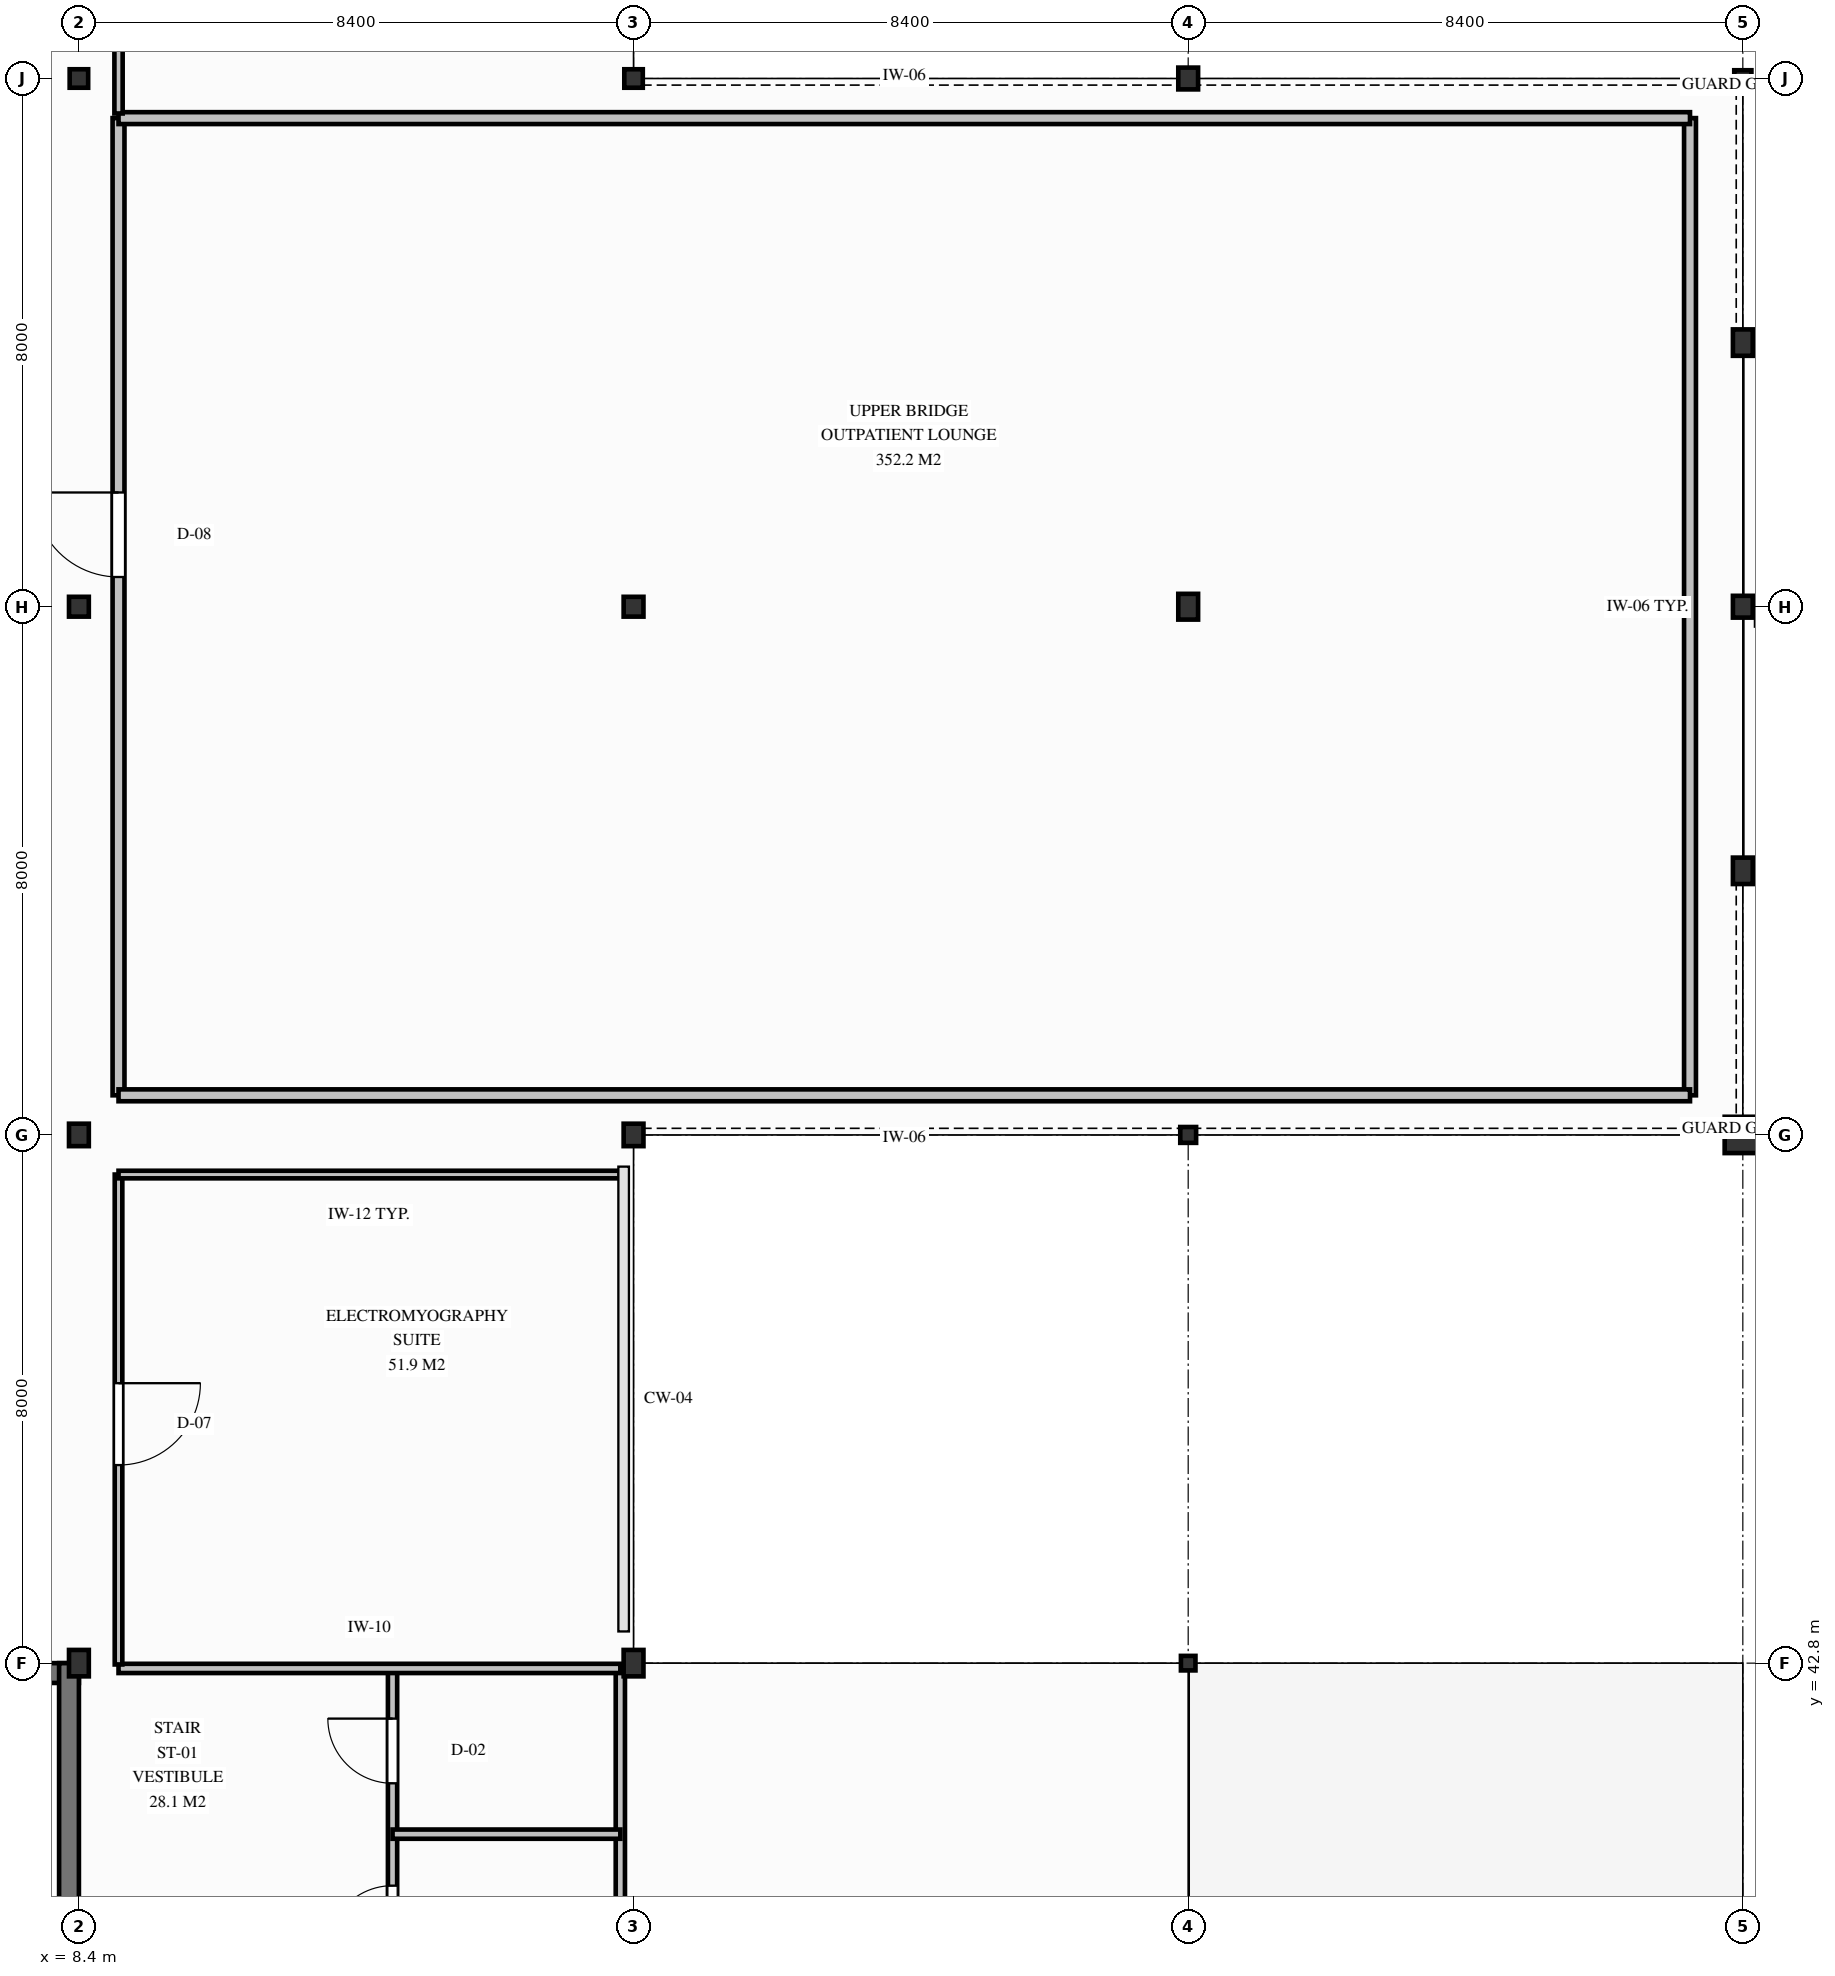
"""IFC4 building model, lengths in metres.
Left out: names, types, materials, properties, quantities, classifications, styles, units other than length and angle.
Written with IfcOpenShell. Run it as: python <this file> out.ifc"""

import sys

from ifc_helpers import new_model, si_unit, direction, frame, frame_2d, origin, origin_2d, place, context, subcontext, project, spatial, rectangle, hollow_rectangle, i_section, extrude, element, fill, save


model = new_model("IFC4")
c1 = context("Model", 3, precision=1e-05, world=origin(), true_north=direction((0.0, 1.0)))
c2 = subcontext(c1, "Body", "Model", "MODEL_VIEW")
j1 = project(units=[si_unit("LENGTHUNIT", "METRE"), si_unit("PLANEANGLEUNIT", "RADIAN")], contexts=[c1])
p1 = place(None, origin())
s1 = spatial("IfcSite", under=j1, at=p1, CompositionType="ELEMENT")
p2 = place(p1, origin())
s2 = spatial("IfcBuilding", under=s1, at=p2, CompositionType="ELEMENT")
p3 = place(p2, frame((0.0, 0.0, 9.0)))
s3 = spatial("IfcBuildingStorey", under=s2, at=p3, CompositionType="ELEMENT", Elevation=9.0)
p4 = place(p3, frame((0.0, 42.65, 0.0), z_axis=(0.0, 0.0, 1.0), x_axis=(1.0, 0.0, 0.0)))
e1 = element("IfcWall", 1, at=p4, inside=s3, PredefinedType="SHEAR", context=c2, shape_type="SweptSolid", body=[
    extrude(rectangle(XDim=8.4, YDim=0.3, at=frame_2d((4.2, 0.0))), origin(), (0.0, 0.0, 1.0), 4.2),
])
p5 = place(p3, frame((8.25, 34.8, 0.0), z_axis=(0.0, 0.0, 1.0), x_axis=(0.0, 1.0, 0.0)))
e2 = element("IfcWall", 2, at=p5, inside=s3, PredefinedType="SHEAR", context=c2, shape_type="SweptSolid", body=[
    extrude(rectangle(XDim=8.0, YDim=0.3, at=frame_2d((4.0, 0.0))), origin(), (0.0, 0.0, 1.0), 4.2),
])
p6 = place(p5, frame((2.95, 0.0, 0.0)))
e3 = element("IfcOpeningElement", 3, at=p6, cuts=e2, PredefinedType="OPENING", context=c2, shape_type="SweptSolid", body=[
    extrude(rectangle(XDim=1.1, YDim=2.15, at=frame_2d((0.55, 1.075))), frame((0.0, 0.16, 0.0), z_axis=(0.0, -1.0, 0.0), x_axis=(1.0, 0.0, 0.0)), (0.0, 0.0, 1.0), 0.32),
])
p7 = place(p5, frame((1.0, 0.0, 0.0)))
e4 = element("IfcOpeningElement", 4, at=p7, cuts=e2, PredefinedType="OPENING", context=c2, shape_type="SweptSolid", body=[
    extrude(rectangle(XDim=1.1, YDim=2.1, at=frame_2d((0.55, 1.05))), frame((0.0, 0.16, 0.0), z_axis=(0.0, -1.0, 0.0), x_axis=(1.0, 0.0, 0.0)), (0.0, 0.0, 1.0), 0.32),
])
p8 = place(p3, frame((8.4, 42.8, 0.0), z_axis=(0.0, 0.0, 1.0), x_axis=(1.0, 0.0, 0.0)))
e5 = element("IfcColumn", 5, at=p8, inside=s3, PredefinedType="COLUMN", context=c2, shape_type="SweptSolid", body=[
    extrude(i_section(OverallWidth=0.3, OverallDepth=0.4, WebThickness=0.013, FlangeThickness=0.024, FilletRadius=0.027, at=origin_2d()), origin(), (0.0, 0.0, 1.0), 4.2),
])
p9 = place(p3, frame((8.4, 50.8, 0.0), z_axis=(0.0, 0.0, 1.0), x_axis=(1.0, 0.0, 0.0)))
e6 = element("IfcColumn", 6, at=p9, inside=s3, PredefinedType="COLUMN", context=c2, shape_type="SweptSolid", body=[
    extrude(i_section(OverallWidth=0.3, OverallDepth=0.34, WebThickness=0.012, FlangeThickness=0.021, FilletRadius=0.027, at=origin_2d()), origin(), (0.0, 0.0, 1.0), 4.2),
])
p10 = place(p3, frame((8.4, 58.8, 0.0), z_axis=(0.0, 0.0, 1.0), x_axis=(1.0, 0.0, 0.0)))
e7 = element("IfcColumn", 7, at=p10, inside=s3, PredefinedType="COLUMN", context=c2, shape_type="SweptSolid", body=[
    extrude(i_section(OverallWidth=0.3, OverallDepth=0.3, WebThickness=0.011, FlangeThickness=0.019, FilletRadius=0.027, at=origin_2d()), origin(), (0.0, 0.0, 1.0), 4.2),
])
p11 = place(p3, frame((8.4, 66.8, 0.0), z_axis=(0.0, 0.0, 1.0), x_axis=(1.0, 0.0, 0.0)))
e8 = element("IfcColumn", 8, at=p11, inside=s3, PredefinedType="COLUMN", context=c2, shape_type="SweptSolid", body=[
    extrude(i_section(OverallWidth=0.28, OverallDepth=0.28, WebThickness=0.01, FlangeThickness=0.018, FilletRadius=0.024, at=origin_2d()), origin(), (0.0, 0.0, 1.0), 4.2),
])
p12 = place(p3, frame((16.8, 42.8, 0.0), z_axis=(0.0, 0.0, 1.0), x_axis=(1.0, 0.0, 0.0)))
e9 = element("IfcColumn", 9, at=p12, inside=s3, PredefinedType="COLUMN", context=c2, shape_type="SweptSolid", body=[
    extrude(i_section(OverallWidth=0.3, OverallDepth=0.4, WebThickness=0.013, FlangeThickness=0.024, FilletRadius=0.027, at=origin_2d()), origin(), (0.0, 0.0, 1.0), 4.2),
])
p13 = place(p3, frame((16.8, 50.8, 0.0), z_axis=(0.0, 0.0, 1.0), x_axis=(1.0, 0.0, 0.0)))
e10 = element("IfcColumn", 10, at=p13, inside=s3, PredefinedType="COLUMN", context=c2, shape_type="SweptSolid", body=[
    extrude(i_section(OverallWidth=0.3, OverallDepth=0.34, WebThickness=0.012, FlangeThickness=0.021, FilletRadius=0.027, at=origin_2d()), origin(), (0.0, 0.0, 1.0), 4.2),
])
p14 = place(p3, frame((16.8, 58.8, 0.0), z_axis=(0.0, 0.0, 1.0), x_axis=(1.0, 0.0, 0.0)))
e11 = element("IfcColumn", 11, at=p14, inside=s3, PredefinedType="COLUMN", context=c2, shape_type="SweptSolid", body=[
    extrude(i_section(OverallWidth=0.3, OverallDepth=0.3, WebThickness=0.011, FlangeThickness=0.019, FilletRadius=0.027, at=origin_2d()), origin(), (0.0, 0.0, 1.0), 4.2),
])
p15 = place(p3, frame((16.8, 66.8, 0.0), z_axis=(0.0, 0.0, 1.0), x_axis=(1.0, 0.0, 0.0)))
e12 = element("IfcColumn", 12, at=p15, inside=s3, PredefinedType="COLUMN", context=c2, shape_type="SweptSolid", body=[
    extrude(i_section(OverallWidth=0.28, OverallDepth=0.28, WebThickness=0.01, FlangeThickness=0.018, FilletRadius=0.024, at=origin_2d()), origin(), (0.0, 0.0, 1.0), 4.2),
])
p16 = place(p3, frame((25.2, 42.8, 0.0), z_axis=(0.0, 0.0, 1.0), x_axis=(1.0, 0.0, 0.0)))
e13 = element("IfcColumn", 13, at=p16, inside=s3, PredefinedType="COLUMN", context=c2, shape_type="SweptSolid", body=[
    extrude(hollow_rectangle(XDim=0.22, YDim=0.22, WallThickness=0.012, InnerFilletRadius=0.019, OuterFilletRadius=0.031, at=origin_2d()), origin(), (0.0, 0.0, 1.0), 4.55),
])
p17 = place(p3, frame((25.2, 50.8, 0.0), z_axis=(0.0, 0.0, 1.0), x_axis=(1.0, 0.0, 0.0)))
e14 = element("IfcColumn", 14, at=p17, inside=s3, PredefinedType="COLUMN", context=c2, shape_type="SweptSolid", body=[
    extrude(i_section(OverallWidth=0.24, OverallDepth=0.24, WebThickness=0.01, FlangeThickness=0.017, FilletRadius=0.021, at=origin_2d()), origin(), (0.0, 0.0, 1.0), 4.2),
])
p18 = place(p3, frame((25.2, 58.8, 0.0), z_axis=(0.0, 0.0, 1.0), x_axis=(1.0, 0.0, 0.0)))
e15 = element("IfcColumn", 15, at=p18, inside=s3, PredefinedType="COLUMN", context=c2, shape_type="SweptSolid", body=[
    extrude(i_section(OverallWidth=0.3, OverallDepth=0.39, WebThickness=0.011, FlangeThickness=0.019, FilletRadius=0.027, at=origin_2d()), origin(), (0.0, 0.0, 1.0), 4.2),
])
p19 = place(p3, frame((25.2, 66.8, 0.0), z_axis=(0.0, 0.0, 1.0), x_axis=(1.0, 0.0, 0.0)))
e16 = element("IfcColumn", 16, at=p19, inside=s3, PredefinedType="COLUMN", context=c2, shape_type="SweptSolid", body=[
    extrude(i_section(OverallWidth=0.3, OverallDepth=0.33, WebThickness=0.01, FlangeThickness=0.017, FilletRadius=0.027, at=origin_2d()), origin(), (0.0, 0.0, 1.0), 4.2),
])
p20 = place(p3, frame((33.6, 50.8, 0.0), z_axis=(0.0, 0.0, 1.0), x_axis=(1.0, 0.0, 0.0)))
e17 = element("IfcColumn", 17, at=p20, inside=s3, PredefinedType="COLUMN", context=c2, shape_type="SweptSolid", body=[
    extrude(rectangle(XDim=0.55, YDim=0.55, at=origin_2d()), origin(), (0.0, 0.0, 1.0), 4.2),
])
p21 = place(p3, frame((33.6, 54.8, 0.0), z_axis=(0.0, 0.0, 1.0), x_axis=(1.0, 0.0, 0.0)))
e18 = element("IfcColumn", 18, at=p21, inside=s3, PredefinedType="COLUMN", context=c2, shape_type="SweptSolid", body=[
    extrude(i_section(OverallWidth=0.3, OverallDepth=0.4, WebThickness=0.013, FlangeThickness=0.024, FilletRadius=0.027, at=origin_2d()), origin(), (0.0, 0.0, 1.0), 4.65),
])
p22 = place(p3, frame((33.6, 58.8, 0.0), z_axis=(0.0, 0.0, 1.0), x_axis=(1.0, 0.0, 0.0)))
e19 = element("IfcColumn", 19, at=p22, inside=s3, PredefinedType="COLUMN", context=c2, shape_type="SweptSolid", body=[
    extrude(i_section(OverallWidth=0.3, OverallDepth=0.33, WebThickness=0.01, FlangeThickness=0.017, FilletRadius=0.027, at=origin_2d()), origin(), (0.0, 0.0, 1.0), 4.2),
])
p23 = place(p3, frame((33.6, 62.8, 0.0), z_axis=(0.0, 0.0, 1.0), x_axis=(1.0, 0.0, 0.0)))
e20 = element("IfcColumn", 20, at=p23, inside=s3, PredefinedType="COLUMN", context=c2, shape_type="SweptSolid", body=[
    extrude(i_section(OverallWidth=0.3, OverallDepth=0.4, WebThickness=0.013, FlangeThickness=0.024, FilletRadius=0.027, at=origin_2d()), origin(), (0.0, 0.0, 1.0), 4.65),
])
p24 = place(p3, frame((33.6, 66.8, 0.0), z_axis=(0.0, 0.0, 1.0), x_axis=(1.0, 0.0, 0.0)))
e21 = element("IfcColumn", 21, at=p24, inside=s3, PredefinedType="COLUMN", context=c2, shape_type="SweptSolid", body=[
    extrude(i_section(OverallWidth=0.26, OverallDepth=0.25, WebThickness=0.008, FlangeThickness=0.012, FilletRadius=0.024, at=origin_2d()), origin(), (0.0, 0.0, 1.0), 4.2),
])
p25 = place(p3, frame((13.15, 34.9, 0.0), z_axis=(0.0, 0.0, 1.0), x_axis=(0.0, 1.0, 0.0)))
e22 = element("IfcWall", 22, at=p25, inside=s3, PredefinedType="PARTITIONING", context=c2, shape_type="SweptSolid", body=[
    extrude(rectangle(XDim=7.82, YDim=0.14, at=frame_2d((3.91, 0.0))), origin(), (0.0, 0.0, 1.0), 3.538),
])
p26 = place(p25, frame((0.9, 0.0, 0.0)))
e23 = element("IfcOpeningElement", 23, at=p26, cuts=e22, PredefinedType="OPENING", context=c2, shape_type="SweptSolid", body=[
    extrude(rectangle(XDim=0.95, YDim=2.12, at=frame_2d((0.475, 1.06))), frame((0.0, 0.08, 0.0), z_axis=(0.0, -1.0, 0.0), x_axis=(1.0, 0.0, 0.0)), (0.0, 0.0, 1.0), 0.16),
])
p27 = place(p25, frame((3.55, 0.0, 0.0)))
e24 = element("IfcOpeningElement", 24, at=p27, cuts=e22, PredefinedType="OPENING", context=c2, shape_type="SweptSolid", body=[
    extrude(rectangle(XDim=0.98, YDim=2.14, at=frame_2d((0.49, 1.07))), frame((0.0, 0.08, 0.0), z_axis=(0.0, -1.0, 0.0), x_axis=(1.0, 0.0, 0.0)), (0.0, 0.0, 1.0), 0.16),
])
p28 = place(p25, frame((6.08, 0.0, 0.0)))
e25 = element("IfcOpeningElement", 25, at=p28, cuts=e22, PredefinedType="OPENING", context=c2, shape_type="SweptSolid", body=[
    extrude(rectangle(XDim=0.98, YDim=2.14, at=frame_2d((0.49, 1.07))), frame((0.0, 0.08, 0.0), z_axis=(0.0, -1.0, 0.0), x_axis=(1.0, 0.0, 0.0)), (0.0, 0.0, 1.0), 0.16),
])
p29 = place(p3, frame((16.6, 34.9, 0.0), z_axis=(0.0, 0.0, 1.0), x_axis=(0.0, 1.0, 0.0)))
e26 = element("IfcWall", 26, at=p29, inside=s3, PredefinedType="PARTITIONING", context=c2, shape_type="SweptSolid", body=[
    extrude(rectangle(XDim=7.82, YDim=0.14, at=frame_2d((3.91, 0.0))), origin(), (0.0, 0.0, 1.0), 3.538),
])
p30 = place(p3, frame((9.0, 42.72, 0.0), z_axis=(0.0, 0.0, 1.0), x_axis=(1.0, 0.0, 0.0)))
e27 = element("IfcWall", 27, at=p30, inside=s3, PredefinedType="PARTITIONING", context=c2, shape_type="SweptSolid", body=[
    extrude(rectangle(XDim=7.6, YDim=0.14, at=frame_2d((3.8, 0.0))), origin(), (0.0, 0.0, 1.0), 3.628),
])
p31 = place(p3, frame((13.15, 40.21, 0.0), z_axis=(0.0, 0.0, 1.0), x_axis=(1.0, 0.0, 0.0)))
e28 = element("IfcWall", 28, at=p31, inside=s3, PredefinedType="PARTITIONING", context=c2, shape_type="SweptSolid", body=[
    extrude(rectangle(XDim=3.45, YDim=0.14, at=frame_2d((1.725, 0.0))), origin(), (0.0, 0.0, 1.0), 3.628),
])
p32 = place(p3, frame((9.0, 50.2, 0.0), z_axis=(0.0, 0.0, 1.0), x_axis=(0.0, -1.0, 0.0)))
e29 = element("IfcWall", 29, at=p32, inside=s3, PredefinedType="PARTITIONING", context=c2, shape_type="SweptSolid", body=[
    extrude(rectangle(XDim=7.42, YDim=0.115, at=frame_2d((3.71, 0.0))), origin(), (0.0, 0.0, 1.0), 3.658),
])
p33 = place(p32, frame((3.16, 0.0, 0.0)))
e30 = element("IfcOpeningElement", 30, at=p33, cuts=e29, PredefinedType="OPENING", context=c2, shape_type="SweptSolid", body=[
    extrude(rectangle(XDim=1.24, YDim=2.2, at=frame_2d((0.62, 1.1))), frame((0.0, 0.067, 0.0), z_axis=(0.0, -1.0, 0.0), x_axis=(1.0, 0.0, 0.0)), (0.0, 0.0, 1.0), 0.135),
])
p34 = place(p3, frame((16.59, 50.2, 0.0), z_axis=(0.0, 0.0, 1.0), x_axis=(-1.0, 0.0, 0.0)))
e31 = element("IfcWall", 31, at=p34, inside=s3, PredefinedType="PARTITIONING", context=c2, shape_type="SweptSolid", body=[
    extrude(rectangle(XDim=7.59, YDim=0.115, at=frame_2d((3.795, 0.0))), origin(), (0.0, 0.0, 1.0), 3.648),
])
p35 = place(p3, frame((9.0, 51.4, 0.0), z_axis=(0.0, 0.0, 1.0), x_axis=(0.0, 1.0, 0.0)))
e32 = element("IfcWall", 32, at=p35, inside=s3, PredefinedType="PARTITIONING", context=c2, shape_type="SweptSolid", body=[
    extrude(rectangle(XDim=14.8, YDim=0.18, at=frame_2d((7.4, 0.0))), origin(), (0.0, 0.0, 1.0), 3.598),
])
p36 = place(p35, frame((7.85, 0.0, 0.0)))
e33 = element("IfcOpeningElement", 33, at=p36, cuts=e32, PredefinedType="OPENING", context=c2, shape_type="SweptSolid", body=[
    extrude(rectangle(XDim=1.28, YDim=2.22, at=frame_2d((0.64, 1.11))), frame((0.0, 0.1, 0.0), z_axis=(0.0, -1.0, 0.0), x_axis=(1.0, 0.0, 0.0)), (0.0, 0.0, 1.0), 0.2),
])
p37 = place(p3, frame((32.8, 66.2, 0.0), z_axis=(0.0, 0.0, 1.0), x_axis=(0.0, -1.0, 0.0)))
e34 = element("IfcWall", 34, at=p37, inside=s3, PredefinedType="PARTITIONING", context=c2, shape_type="SweptSolid", body=[
    extrude(rectangle(XDim=14.8, YDim=0.18, at=frame_2d((7.4, 0.0))), origin(), (0.0, 0.0, 1.0), 3.478),
])
p38 = place(p3, frame((9.0, 66.2, 0.0), z_axis=(0.0, 0.0, 1.0), x_axis=(1.0, 0.0, 0.0)))
e35 = element("IfcWall", 35, at=p38, inside=s3, PredefinedType="PARTITIONING", context=c2, shape_type="SweptSolid", body=[
    extrude(rectangle(XDim=23.8, YDim=0.18, at=frame_2d((11.9, 0.0))), origin(), (0.0, 0.0, 1.0), 3.378),
])
p39 = place(p3, frame((32.8, 51.4, 0.0), z_axis=(0.0, 0.0, 1.0), x_axis=(-1.0, 0.0, 0.0)))
e36 = element("IfcWall", 36, at=p39, inside=s3, PredefinedType="PARTITIONING", context=c2, shape_type="SweptSolid", body=[
    extrude(rectangle(XDim=23.8, YDim=0.18, at=frame_2d((11.9, 0.0))), origin(), (0.0, 0.0, 1.0), 3.628),
])
p40 = place(p3, frame((9.0, 82.7, 0.0), z_axis=(0.0, 0.0, 1.0), x_axis=(0.0, -1.0, 0.0)))
e37 = element("IfcWall", 37, at=p40, inside=s3, PredefinedType="PARTITIONING", context=c2, shape_type="SweptSolid", body=[
    extrude(rectangle(XDim=16.43, YDim=0.125, at=frame_2d((8.215, 0.0))), origin(), (0.0, 0.0, 1.0), 3.478),
])
p41 = place(p40, frame((8.4, 0.0, 0.0)))
e38 = element("IfcOpeningElement", 38, at=p41, cuts=e37, PredefinedType="OPENING", context=c2, shape_type="SweptSolid", body=[
    extrude(rectangle(XDim=1.12, YDim=2.18, at=frame_2d((0.56, 1.09))), frame((0.0, 0.073, 0.0), z_axis=(0.0, -1.0, 0.0), x_axis=(1.0, 0.0, 0.0)), (0.0, 0.0, 1.0), 0.145),
])
p42 = place(p27, origin())
e39 = element("IfcDoor", 39, at=p42, inside=s3, OperationType="SINGLE_SWING_LEFT", PredefinedType="DOOR", context=c2, shape_type="SweptSolid", body=[
    extrude(rectangle(XDim=0.98, YDim=2.14, at=frame_2d((0.49, 1.07))), frame((0.0, 0.025, 0.0), z_axis=(0.0, -1.0, 0.0), x_axis=(1.0, 0.0, 0.0)), (0.0, 0.0, 1.0), 0.05),
])
fill(e24, e39)
p43 = place(p28, origin())
e40 = element("IfcDoor", 40, at=p43, inside=s3, OperationType="SINGLE_SWING_RIGHT", PredefinedType="DOOR", context=c2, shape_type="SweptSolid", body=[
    extrude(rectangle(XDim=0.98, YDim=2.14, at=frame_2d((0.49, 1.07))), frame((0.0, 0.025, 0.0), z_axis=(0.0, -1.0, 0.0), x_axis=(1.0, 0.0, 0.0)), (0.0, 0.0, 1.0), 0.05),
])
fill(e25, e40)
p44 = place(p33, origin())
e41 = element("IfcDoor", 41, at=p44, inside=s3, OperationType="SINGLE_SWING_LEFT", PredefinedType="DOOR", context=c2, shape_type="SweptSolid", body=[
    extrude(rectangle(XDim=1.24, YDim=2.2, at=frame_2d((0.62, 1.1))), frame((0.0, 0.025, 0.0), z_axis=(0.0, -1.0, 0.0), x_axis=(1.0, 0.0, 0.0)), (0.0, 0.0, 1.0), 0.05),
])
fill(e30, e41)
p45 = place(p36, origin())
e42 = element("IfcDoor", 42, at=p45, inside=s3, OperationType="SINGLE_SWING_RIGHT", PredefinedType="DOOR", context=c2, shape_type="SweptSolid", body=[
    extrude(rectangle(XDim=1.28, YDim=2.22, at=frame_2d((0.64, 1.11))), frame((0.0, 0.025, 0.0), z_axis=(0.0, -1.0, 0.0), x_axis=(1.0, 0.0, 0.0)), (0.0, 0.0, 1.0), 0.05),
])
fill(e33, e42)
save(model, sys.argv[1])
